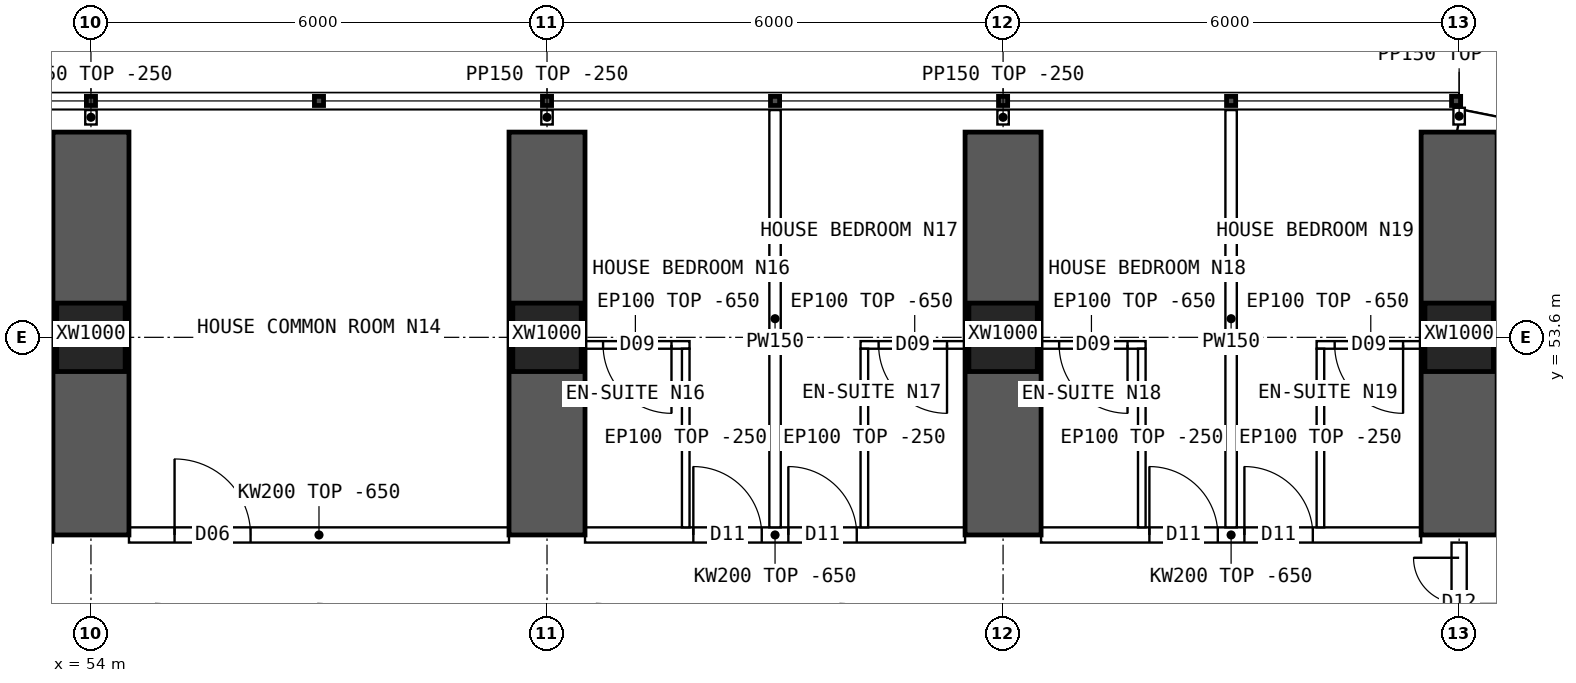
"""IFC4 building model, lengths in metres.
Left out: names, types, materials, properties, quantities, classifications, styles, units other than length and angle.
Written with IfcOpenShell. Run it as: python <this file> out.ifc"""

import sys

from ifc_helpers import new_model, si_unit, direction, frame, frame_2d, origin, origin_2d, place, context, subcontext, project, spatial, polyline, rectangle, hollow_rectangle, outline, extrude, element, fill, save


model = new_model("IFC4")
c1 = context("Model", 3, precision=1e-05, world=origin(), true_north=direction((0.0, 1.0)))
c2 = subcontext(c1, "Body", "Model", "MODEL_VIEW")
j1 = project(units=[si_unit("LENGTHUNIT", "METRE"), si_unit("PLANEANGLEUNIT", "RADIAN")], contexts=[c1])
p1 = place(None, origin())
s1 = spatial("IfcSite", under=j1, at=p1, CompositionType="ELEMENT")
p2 = place(p1, origin())
s2 = spatial("IfcBuilding", under=s1, at=p2, CompositionType="ELEMENT")
p3 = place(p2, frame((0.0, 0.0, 23.95)))
s3 = spatial("IfcBuildingStorey", under=s2, at=p3, CompositionType="ELEMENT", Elevation=23.95)
for number, where, z_axis, x_axis in (
    (1, (54.0, 53.6, 0.0), (0.0, 0.0, 1.0), (1.0, 0.0, 0.0)),
    (2, (60.0, 53.6, 0.0), (0.0, 0.0, 1.0), (1.0, 0.0, 0.0)),
    (3, (66.0, 53.6, 0.0), (0.0, 0.0, 1.0), (1.0, 0.0, 0.0)),
    (4, (72.0, 53.6, 0.0), (0.0, 0.0, 1.0), (1.0, 0.0, 0.0)),
):
    element("IfcColumn", number, at=place(p3, frame(where, z_axis=z_axis, x_axis=x_axis)), inside=s3, PredefinedType="COLUMN", context=c2, shape_type="SweptSolid", body=[
        extrude(hollow_rectangle(XDim=0.9, YDim=0.9, WallThickness=0.09, at=origin_2d()), origin(), (0.0, 0.0, 1.0), 3.75),
    ])
for number, where, z_axis, x_axis in (
    (5, (54.0, 51.0, 0.0), (0.0, 0.0, 1.0), (0.0, 1.0, 0.0)),
    (6, (60.0, 51.0, 0.0), (0.0, 0.0, 1.0), (0.0, 1.0, 0.0)),
    (7, (66.0, 51.0, 0.0), (0.0, 0.0, 1.0), (0.0, 1.0, 0.0)),
    (8, (72.0, 51.0, 0.0), (0.0, 0.0, 1.0), (0.0, 1.0, 0.0)),
):
    element("IfcWall", number, at=place(p3, frame(where, z_axis=z_axis, x_axis=x_axis)), inside=s3, PredefinedType="SHEAR", context=c2, shape_type="SweptSolid", body=[
        extrude(rectangle(XDim=5.3, YDim=1.0, at=frame_2d((2.65, 0.0))), origin(), (0.0, 0.0, 1.0), 3.75),
    ])
p4 = place(p3, frame((75.157, 55.822, 0.0), z_axis=(0.0, 0.0, 1.0), x_axis=(-0.980787251524, 0.195080412259, 0.0)))
e9 = element("IfcWall", 9, at=p4, inside=s3, PredefinedType="SOLIDWALL", context=c2, shape_type="SweptSolid", body=[
    extrude(outline(polyline([(-0.03, -0.15), (3.249, -0.15), (3.189, 0.15), (0.03, 0.15), (-0.03, -0.15)])), origin(), (0.0, 0.0, 1.0), 3.5),
])
p5 = place(p4, frame((0.909, 0.0, 0.9)))
e10 = element("IfcOpeningElement", 10, at=p5, cuts=e9, PredefinedType="OPENING", context=c2, shape_type="SweptSolid", body=[
    extrude(rectangle(XDim=1.4, YDim=1.8, at=frame_2d((0.7, 0.9))), frame((0.0, 0.16, 0.0), z_axis=(0.0, -1.0, 0.0), x_axis=(1.0, 0.0, 0.0)), (0.0, 0.0, 1.0), 0.32),
])
p6 = place(p3, frame((54.5, 51.0, 0.0), z_axis=(0.0, 0.0, 1.0), x_axis=(1.0, 0.0, 0.0)))
e11 = element("IfcWall", 11, at=p6, inside=s3, PredefinedType="SOLIDWALL", context=c2, shape_type="SweptSolid", body=[
    extrude(outline(polyline([(0.0, 0.0), (5.0, 0.0), (5.0, 3.1), (0.0, 3.1), (0.0, 0.0)])), frame((0.0, 0.1, 0.0), z_axis=(0.0, -1.0, 0.0), x_axis=(1.0, 0.0, 0.0)), (0.0, 0.0, 1.0), 0.2),
])
p7 = place(p6, frame((0.6, 0.0, 0.0)))
e12 = element("IfcOpeningElement", 12, at=p7, cuts=e11, PredefinedType="OPENING", context=c2, shape_type="SweptSolid", body=[
    extrude(rectangle(XDim=1.0, YDim=2.1, at=frame_2d((0.5, 1.05))), frame((0.0, 0.11, 0.0), z_axis=(0.0, -1.0, 0.0), x_axis=(1.0, 0.0, 0.0)), (0.0, 0.0, 1.0), 0.22),
])
p8 = place(p3, frame((60.5, 51.0, 0.0), z_axis=(0.0, 0.0, 1.0), x_axis=(1.0, 0.0, 0.0)))
e13 = element("IfcWall", 13, at=p8, inside=s3, PredefinedType="SOLIDWALL", context=c2, shape_type="SweptSolid", body=[
    extrude(outline(polyline([(0.0, 0.0), (5.0, 0.0), (5.0, 3.1), (0.0, 3.1), (0.0, 0.0)])), frame((0.0, 0.1, 0.0), z_axis=(0.0, -1.0, 0.0), x_axis=(1.0, 0.0, 0.0)), (0.0, 0.0, 1.0), 0.2),
])
p9 = place(p8, frame((1.425, 0.0, 0.0)))
e14 = element("IfcOpeningElement", 14, at=p9, cuts=e13, PredefinedType="OPENING", context=c2, shape_type="SweptSolid", body=[
    extrude(rectangle(XDim=0.9, YDim=2.1, at=frame_2d((0.45, 1.05))), frame((0.0, 0.11, 0.0), z_axis=(0.0, -1.0, 0.0), x_axis=(1.0, 0.0, 0.0)), (0.0, 0.0, 1.0), 0.22),
])
p10 = place(p8, frame((2.675, 0.0, 0.0)))
e15 = element("IfcOpeningElement", 15, at=p10, cuts=e13, PredefinedType="OPENING", context=c2, shape_type="SweptSolid", body=[
    extrude(rectangle(XDim=0.9, YDim=2.1, at=frame_2d((0.45, 1.05))), frame((0.0, 0.11, 0.0), z_axis=(0.0, -1.0, 0.0), x_axis=(1.0, 0.0, 0.0)), (0.0, 0.0, 1.0), 0.22),
])
p11 = place(p3, frame((66.5, 51.0, 0.0), z_axis=(0.0, 0.0, 1.0), x_axis=(1.0, 0.0, 0.0)))
e16 = element("IfcWall", 16, at=p11, inside=s3, PredefinedType="SOLIDWALL", context=c2, shape_type="SweptSolid", body=[
    extrude(outline(polyline([(0.0, 0.0), (5.0, 0.0), (5.0, 3.1), (0.0, 3.1), (0.0, 0.0)])), frame((0.0, 0.1, 0.0), z_axis=(0.0, -1.0, 0.0), x_axis=(1.0, 0.0, 0.0)), (0.0, 0.0, 1.0), 0.2),
])
p12 = place(p11, frame((1.425, 0.0, 0.0)))
e17 = element("IfcOpeningElement", 17, at=p12, cuts=e16, PredefinedType="OPENING", context=c2, shape_type="SweptSolid", body=[
    extrude(rectangle(XDim=0.9, YDim=2.1, at=frame_2d((0.45, 1.05))), frame((0.0, 0.11, 0.0), z_axis=(0.0, -1.0, 0.0), x_axis=(1.0, 0.0, 0.0)), (0.0, 0.0, 1.0), 0.22),
])
p13 = place(p11, frame((2.675, 0.0, 0.0)))
e18 = element("IfcOpeningElement", 18, at=p13, cuts=e16, PredefinedType="OPENING", context=c2, shape_type="SweptSolid", body=[
    extrude(rectangle(XDim=0.9, YDim=2.1, at=frame_2d((0.45, 1.05))), frame((0.0, 0.11, 0.0), z_axis=(0.0, -1.0, 0.0), x_axis=(1.0, 0.0, 0.0)), (0.0, 0.0, 1.0), 0.22),
])
p14 = place(p3, frame((52.125, 53.5, 0.0), z_axis=(0.0, 0.0, 1.0), x_axis=(1.0, 0.0, 0.0)))
e19 = element("IfcWall", 19, at=p14, inside=s3, PredefinedType="PARTITIONING", context=c2, shape_type="SweptSolid", body=[
    extrude(outline(polyline([(0.0, 0.0), (1.425, 0.0), (1.425, 3.1), (0.0, 3.1), (0.0, 0.0)])), frame((0.0, 0.05, 0.0), z_axis=(0.0, -1.0, 0.0), x_axis=(1.0, 0.0, 0.0)), (0.0, 0.0, 1.0), 0.1),
])
p15 = place(p14, frame((0.238, 0.0, 0.0)))
e20 = element("IfcOpeningElement", 20, at=p15, cuts=e19, PredefinedType="OPENING", context=c2, shape_type="SweptSolid", body=[
    extrude(rectangle(XDim=0.9, YDim=2.1, at=frame_2d((0.45, 1.05))), frame((0.0, 0.06, 0.0), z_axis=(0.0, -1.0, 0.0), x_axis=(1.0, 0.0, 0.0)), (0.0, 0.0, 1.0), 0.12),
])
p16 = place(p3, frame((63.0, 56.59, 0.0), z_axis=(0.0, 0.0, 1.0), x_axis=(0.0, -1.0, 0.0)))
e21 = element("IfcWall", 21, at=p16, inside=s3, PredefinedType="PARTITIONING", context=c2, shape_type="SweptSolid", body=[
    extrude(outline(polyline([(0.0, 0.0), (5.49, 0.0), (5.49, 3.1), (5.442, 3.1), (5.44, 3.5), (3.192, 3.5), (3.19, 3.1), (2.792, 3.1), (2.79, 3.5), (0.0, 3.5), (0.0, 0.0)])), frame((0.0, 0.075, 0.0), z_axis=(0.0, -1.0, 0.0), x_axis=(1.0, 0.0, 0.0)), (0.0, 0.0, 1.0), 0.15),
])
p17 = place(p3, frame((60.45, 53.5, 0.0), z_axis=(0.0, 0.0, 1.0), x_axis=(1.0, 0.0, 0.0)))
e22 = element("IfcWall", 22, at=p17, inside=s3, PredefinedType="PARTITIONING", context=c2, shape_type="SweptSolid", body=[
    extrude(outline(polyline([(0.0, 0.0), (1.425, 0.0), (1.425, 3.1), (0.0, 3.1), (0.0, 0.0)])), frame((0.0, 0.05, 0.0), z_axis=(0.0, -1.0, 0.0), x_axis=(1.0, 0.0, 0.0)), (0.0, 0.0, 1.0), 0.1),
])
p18 = place(p17, frame((0.288, 0.0, 0.0)))
e23 = element("IfcOpeningElement", 23, at=p18, cuts=e22, PredefinedType="OPENING", context=c2, shape_type="SweptSolid", body=[
    extrude(rectangle(XDim=0.9, YDim=2.1, at=frame_2d((0.45, 1.05))), frame((0.0, 0.06, 0.0), z_axis=(0.0, -1.0, 0.0), x_axis=(1.0, 0.0, 0.0)), (0.0, 0.0, 1.0), 0.12),
])
p19 = place(p3, frame((61.825, 53.45, 0.0), z_axis=(0.0, 0.0, 1.0), x_axis=(0.0, -1.0, 0.0)))
e24 = element("IfcWall", 24, at=p19, inside=s3, PredefinedType="PARTITIONING", context=c2, shape_type="SweptSolid", body=[
    extrude(outline(polyline([(0.0, 0.0), (2.35, 0.0), (2.35, 3.1), (2.302, 3.1), (2.3, 3.5), (0.052, 3.5), (0.05, 3.1), (0.0, 3.1), (0.0, 0.0)])), frame((0.0, 0.05, 0.0), z_axis=(0.0, -1.0, 0.0), x_axis=(1.0, 0.0, 0.0)), (0.0, 0.0, 1.0), 0.1),
])
p20 = place(p3, frame((64.125, 53.5, 0.0), z_axis=(0.0, 0.0, 1.0), x_axis=(1.0, 0.0, 0.0)))
e25 = element("IfcWall", 25, at=p20, inside=s3, PredefinedType="PARTITIONING", context=c2, shape_type="SweptSolid", body=[
    extrude(outline(polyline([(0.0, 0.0), (1.425, 0.0), (1.425, 3.1), (0.0, 3.1), (0.0, 0.0)])), frame((0.0, 0.05, 0.0), z_axis=(0.0, -1.0, 0.0), x_axis=(1.0, 0.0, 0.0)), (0.0, 0.0, 1.0), 0.1),
])
p21 = place(p20, frame((0.238, 0.0, 0.0)))
e26 = element("IfcOpeningElement", 26, at=p21, cuts=e25, PredefinedType="OPENING", context=c2, shape_type="SweptSolid", body=[
    extrude(rectangle(XDim=0.9, YDim=2.1, at=frame_2d((0.45, 1.05))), frame((0.0, 0.06, 0.0), z_axis=(0.0, -1.0, 0.0), x_axis=(1.0, 0.0, 0.0)), (0.0, 0.0, 1.0), 0.12),
])
p22 = place(p3, frame((64.175, 53.45, 0.0), z_axis=(0.0, 0.0, 1.0), x_axis=(0.0, -1.0, 0.0)))
e27 = element("IfcWall", 27, at=p22, inside=s3, PredefinedType="PARTITIONING", context=c2, shape_type="SweptSolid", body=[
    extrude(outline(polyline([(0.0, 0.0), (2.35, 0.0), (2.35, 3.1), (2.302, 3.1), (2.3, 3.5), (0.052, 3.5), (0.05, 3.1), (0.0, 3.1), (0.0, 0.0)])), frame((0.0, 0.05, 0.0), z_axis=(0.0, -1.0, 0.0), x_axis=(1.0, 0.0, 0.0)), (0.0, 0.0, 1.0), 0.1),
])
p23 = place(p3, frame((69.0, 56.59, 0.0), z_axis=(0.0, 0.0, 1.0), x_axis=(0.0, -1.0, 0.0)))
e28 = element("IfcWall", 28, at=p23, inside=s3, PredefinedType="PARTITIONING", context=c2, shape_type="SweptSolid", body=[
    extrude(outline(polyline([(0.0, 0.0), (5.49, 0.0), (5.49, 3.1), (5.442, 3.1), (5.44, 3.5), (3.192, 3.5), (3.19, 3.1), (2.792, 3.1), (2.79, 3.5), (0.0, 3.5), (0.0, 0.0)])), frame((0.0, 0.075, 0.0), z_axis=(0.0, -1.0, 0.0), x_axis=(1.0, 0.0, 0.0)), (0.0, 0.0, 1.0), 0.15),
])
p24 = place(p3, frame((66.45, 53.5, 0.0), z_axis=(0.0, 0.0, 1.0), x_axis=(1.0, 0.0, 0.0)))
e29 = element("IfcWall", 29, at=p24, inside=s3, PredefinedType="PARTITIONING", context=c2, shape_type="SweptSolid", body=[
    extrude(outline(polyline([(0.0, 0.0), (1.425, 0.0), (1.425, 3.1), (0.0, 3.1), (0.0, 0.0)])), frame((0.0, 0.05, 0.0), z_axis=(0.0, -1.0, 0.0), x_axis=(1.0, 0.0, 0.0)), (0.0, 0.0, 1.0), 0.1),
])
p25 = place(p24, frame((0.288, 0.0, 0.0)))
e30 = element("IfcOpeningElement", 30, at=p25, cuts=e29, PredefinedType="OPENING", context=c2, shape_type="SweptSolid", body=[
    extrude(rectangle(XDim=0.9, YDim=2.1, at=frame_2d((0.45, 1.05))), frame((0.0, 0.06, 0.0), z_axis=(0.0, -1.0, 0.0), x_axis=(1.0, 0.0, 0.0)), (0.0, 0.0, 1.0), 0.12),
])
p26 = place(p3, frame((67.825, 53.45, 0.0), z_axis=(0.0, 0.0, 1.0), x_axis=(0.0, -1.0, 0.0)))
e31 = element("IfcWall", 31, at=p26, inside=s3, PredefinedType="PARTITIONING", context=c2, shape_type="SweptSolid", body=[
    extrude(outline(polyline([(0.0, 0.0), (2.35, 0.0), (2.35, 3.1), (2.302, 3.1), (2.3, 3.5), (0.052, 3.5), (0.05, 3.1), (0.0, 3.1), (0.0, 0.0)])), frame((0.0, 0.05, 0.0), z_axis=(0.0, -1.0, 0.0), x_axis=(1.0, 0.0, 0.0)), (0.0, 0.0, 1.0), 0.1),
])
p27 = place(p3, frame((70.125, 53.5, 0.0), z_axis=(0.0, 0.0, 1.0), x_axis=(1.0, 0.0, 0.0)))
e32 = element("IfcWall", 32, at=p27, inside=s3, PredefinedType="PARTITIONING", context=c2, shape_type="SweptSolid", body=[
    extrude(outline(polyline([(0.0, 0.0), (1.425, 0.0), (1.425, 3.1), (0.0, 3.1), (0.0, 0.0)])), frame((0.0, 0.05, 0.0), z_axis=(0.0, -1.0, 0.0), x_axis=(1.0, 0.0, 0.0)), (0.0, 0.0, 1.0), 0.1),
])
p28 = place(p27, frame((0.238, 0.0, 0.0)))
e33 = element("IfcOpeningElement", 33, at=p28, cuts=e32, PredefinedType="OPENING", context=c2, shape_type="SweptSolid", body=[
    extrude(rectangle(XDim=0.9, YDim=2.1, at=frame_2d((0.45, 1.05))), frame((0.0, 0.06, 0.0), z_axis=(0.0, -1.0, 0.0), x_axis=(1.0, 0.0, 0.0)), (0.0, 0.0, 1.0), 0.12),
])
p29 = place(p3, frame((70.175, 53.45, 0.0), z_axis=(0.0, 0.0, 1.0), x_axis=(0.0, -1.0, 0.0)))
e34 = element("IfcWall", 34, at=p29, inside=s3, PredefinedType="PARTITIONING", context=c2, shape_type="SweptSolid", body=[
    extrude(outline(polyline([(0.0, 0.0), (2.35, 0.0), (2.35, 3.1), (2.302, 3.1), (2.3, 3.5), (0.052, 3.5), (0.05, 3.1), (0.0, 3.1), (0.0, 0.0)])), frame((0.0, 0.05, 0.0), z_axis=(0.0, -1.0, 0.0), x_axis=(1.0, 0.0, 0.0)), (0.0, 0.0, 1.0), 0.1),
])
p30 = place(p3, frame((72.0, 49.3, 0.0), z_axis=(0.0, 0.0, 1.0), x_axis=(0.0, 1.0, 0.0)))
e35 = element("IfcWall", 35, at=p30, inside=s3, PredefinedType="SOLIDWALL", context=c2, shape_type="SweptSolid", body=[
    extrude(outline(polyline([(0.0, 0.0), (1.6, 0.0), (1.6, 3.05), (0.0, 3.05), (0.0, 0.0)])), frame((0.0, 0.1, 0.0), z_axis=(0.0, -1.0, 0.0), x_axis=(1.0, 0.0, 0.0)), (0.0, 0.0, 1.0), 0.2),
])
p31 = place(p30, frame((0.2, 0.0, 0.0)))
e36 = element("IfcOpeningElement", 36, at=p31, cuts=e35, PredefinedType="OPENING", context=c2, shape_type="SweptSolid", body=[
    extrude(rectangle(XDim=1.2, YDim=2.1, at=frame_2d((0.6, 1.05))), frame((0.0, 0.11, 0.0), z_axis=(0.0, -1.0, 0.0), x_axis=(1.0, 0.0, 0.0)), (0.0, 0.0, 1.0), 0.22),
])
for number, where, z_axis, x_axis in (
    (37, (54.0, 56.4, 0.0), (0.0, 0.0, 1.0), (0.0, 1.0, 0.0)),
    (38, (60.0, 56.4, 0.0), (0.0, 0.0, 1.0), (0.0, 1.0, 0.0)),
    (39, (66.0, 56.4, 0.0), (0.0, 0.0, 1.0), (0.0, 1.0, 0.0)),
):
    element("IfcWall", number, at=place(p3, frame(where, z_axis=z_axis, x_axis=x_axis)), inside=s3, PredefinedType="PARTITIONING", context=c2, shape_type="SweptSolid", body=[
        extrude(rectangle(XDim=0.19, YDim=0.15, at=frame_2d((0.095, 0.0))), origin(), (0.0, 0.0, 1.0), 3.5),
    ])
p32 = place(p3, frame((72.0, 56.4, 0.0), z_axis=(0.0, 0.0, 1.0), x_axis=(0.0, 1.0, 0.0)))
e40 = element("IfcWall", 40, at=p32, inside=s3, PredefinedType="PARTITIONING", context=c2, shape_type="SweptSolid", body=[
    extrude(rectangle(XDim=0.22, YDim=0.15, at=frame_2d((0.11, 0.0))), origin(), (0.0, 0.0, 1.0), 3.5),
])
p33 = place(p7, origin())
e41 = element("IfcDoor", 41, at=p33, inside=s3, OperationType="SINGLE_SWING_LEFT", PredefinedType="DOOR", context=c2, shape_type="SweptSolid", body=[
    extrude(rectangle(XDim=1.0, YDim=2.1, at=frame_2d((0.5, 1.05))), frame((0.0, 0.025, 0.0), z_axis=(0.0, -1.0, 0.0), x_axis=(1.0, 0.0, 0.0)), (0.0, 0.0, 1.0), 0.05),
])
fill(e12, e41)
p34 = place(p18, origin())
e42 = element("IfcDoor", 42, at=p34, inside=s3, OperationType="SINGLE_SWING_RIGHT", PredefinedType="DOOR", context=c2, shape_type="SweptSolid", body=[
    extrude(rectangle(XDim=0.9, YDim=2.1, at=frame_2d((0.45, 1.05))), frame((0.0, 0.025, 0.0), z_axis=(0.0, -1.0, 0.0), x_axis=(1.0, 0.0, 0.0)), (0.0, 0.0, 1.0), 0.05),
])
fill(e23, e42)
p35 = place(p9, origin())
e43 = element("IfcDoor", 43, at=p35, inside=s3, OperationType="SINGLE_SWING_LEFT", PredefinedType="DOOR", context=c2, shape_type="SweptSolid", body=[
    extrude(rectangle(XDim=0.9, YDim=2.1, at=frame_2d((0.45, 1.05))), frame((0.0, 0.025, 0.0), z_axis=(0.0, -1.0, 0.0), x_axis=(1.0, 0.0, 0.0)), (0.0, 0.0, 1.0), 0.05),
])
fill(e14, e43)
p36 = place(p21, origin())
e44 = element("IfcDoor", 44, at=p36, inside=s3, OperationType="SINGLE_SWING_RIGHT", PredefinedType="DOOR", context=c2, shape_type="SweptSolid", body=[
    extrude(rectangle(XDim=0.9, YDim=2.1, at=frame_2d((0.45, 1.05))), frame((0.0, 0.025, 0.0), z_axis=(0.0, -1.0, 0.0), x_axis=(1.0, 0.0, 0.0)), (0.0, 0.0, 1.0), 0.05),
])
fill(e26, e44)
p37 = place(p10, origin())
e45 = element("IfcDoor", 45, at=p37, inside=s3, OperationType="SINGLE_SWING_LEFT", PredefinedType="DOOR", context=c2, shape_type="SweptSolid", body=[
    extrude(rectangle(XDim=0.9, YDim=2.1, at=frame_2d((0.45, 1.05))), frame((0.0, 0.025, 0.0), z_axis=(0.0, -1.0, 0.0), x_axis=(1.0, 0.0, 0.0)), (0.0, 0.0, 1.0), 0.05),
])
fill(e15, e45)
p38 = place(p25, origin())
e46 = element("IfcDoor", 46, at=p38, inside=s3, OperationType="SINGLE_SWING_RIGHT", PredefinedType="DOOR", context=c2, shape_type="SweptSolid", body=[
    extrude(rectangle(XDim=0.9, YDim=2.1, at=frame_2d((0.45, 1.05))), frame((0.0, 0.025, 0.0), z_axis=(0.0, -1.0, 0.0), x_axis=(1.0, 0.0, 0.0)), (0.0, 0.0, 1.0), 0.05),
])
fill(e30, e46)
p39 = place(p12, origin())
e47 = element("IfcDoor", 47, at=p39, inside=s3, OperationType="SINGLE_SWING_LEFT", PredefinedType="DOOR", context=c2, shape_type="SweptSolid", body=[
    extrude(rectangle(XDim=0.9, YDim=2.1, at=frame_2d((0.45, 1.05))), frame((0.0, 0.025, 0.0), z_axis=(0.0, -1.0, 0.0), x_axis=(1.0, 0.0, 0.0)), (0.0, 0.0, 1.0), 0.05),
])
fill(e17, e47)
p40 = place(p28, origin())
e48 = element("IfcDoor", 48, at=p40, inside=s3, OperationType="SINGLE_SWING_RIGHT", PredefinedType="DOOR", context=c2, shape_type="SweptSolid", body=[
    extrude(rectangle(XDim=0.9, YDim=2.1, at=frame_2d((0.45, 1.05))), frame((0.0, 0.025, 0.0), z_axis=(0.0, -1.0, 0.0), x_axis=(1.0, 0.0, 0.0)), (0.0, 0.0, 1.0), 0.05),
])
fill(e33, e48)
p41 = place(p13, origin())
e49 = element("IfcDoor", 49, at=p41, inside=s3, OperationType="SINGLE_SWING_LEFT", PredefinedType="DOOR", context=c2, shape_type="SweptSolid", body=[
    extrude(rectangle(XDim=0.9, YDim=2.1, at=frame_2d((0.45, 1.05))), frame((0.0, 0.025, 0.0), z_axis=(0.0, -1.0, 0.0), x_axis=(1.0, 0.0, 0.0)), (0.0, 0.0, 1.0), 0.05),
])
fill(e18, e49)
p42 = place(p31, origin())
e50 = element("IfcDoor", 50, at=p42, inside=s3, OperationType="DOUBLE_DOOR_SINGLE_SWING", PredefinedType="DOOR", context=c2, shape_type="SweptSolid", body=[
    extrude(rectangle(XDim=1.2, YDim=2.1, at=frame_2d((0.6, 1.05))), frame((0.0, 0.025, 0.0), z_axis=(0.0, -1.0, 0.0), x_axis=(1.0, 0.0, 0.0)), (0.0, 0.0, 1.0), 0.05),
])
fill(e36, e50)
save(model, sys.argv[1])
